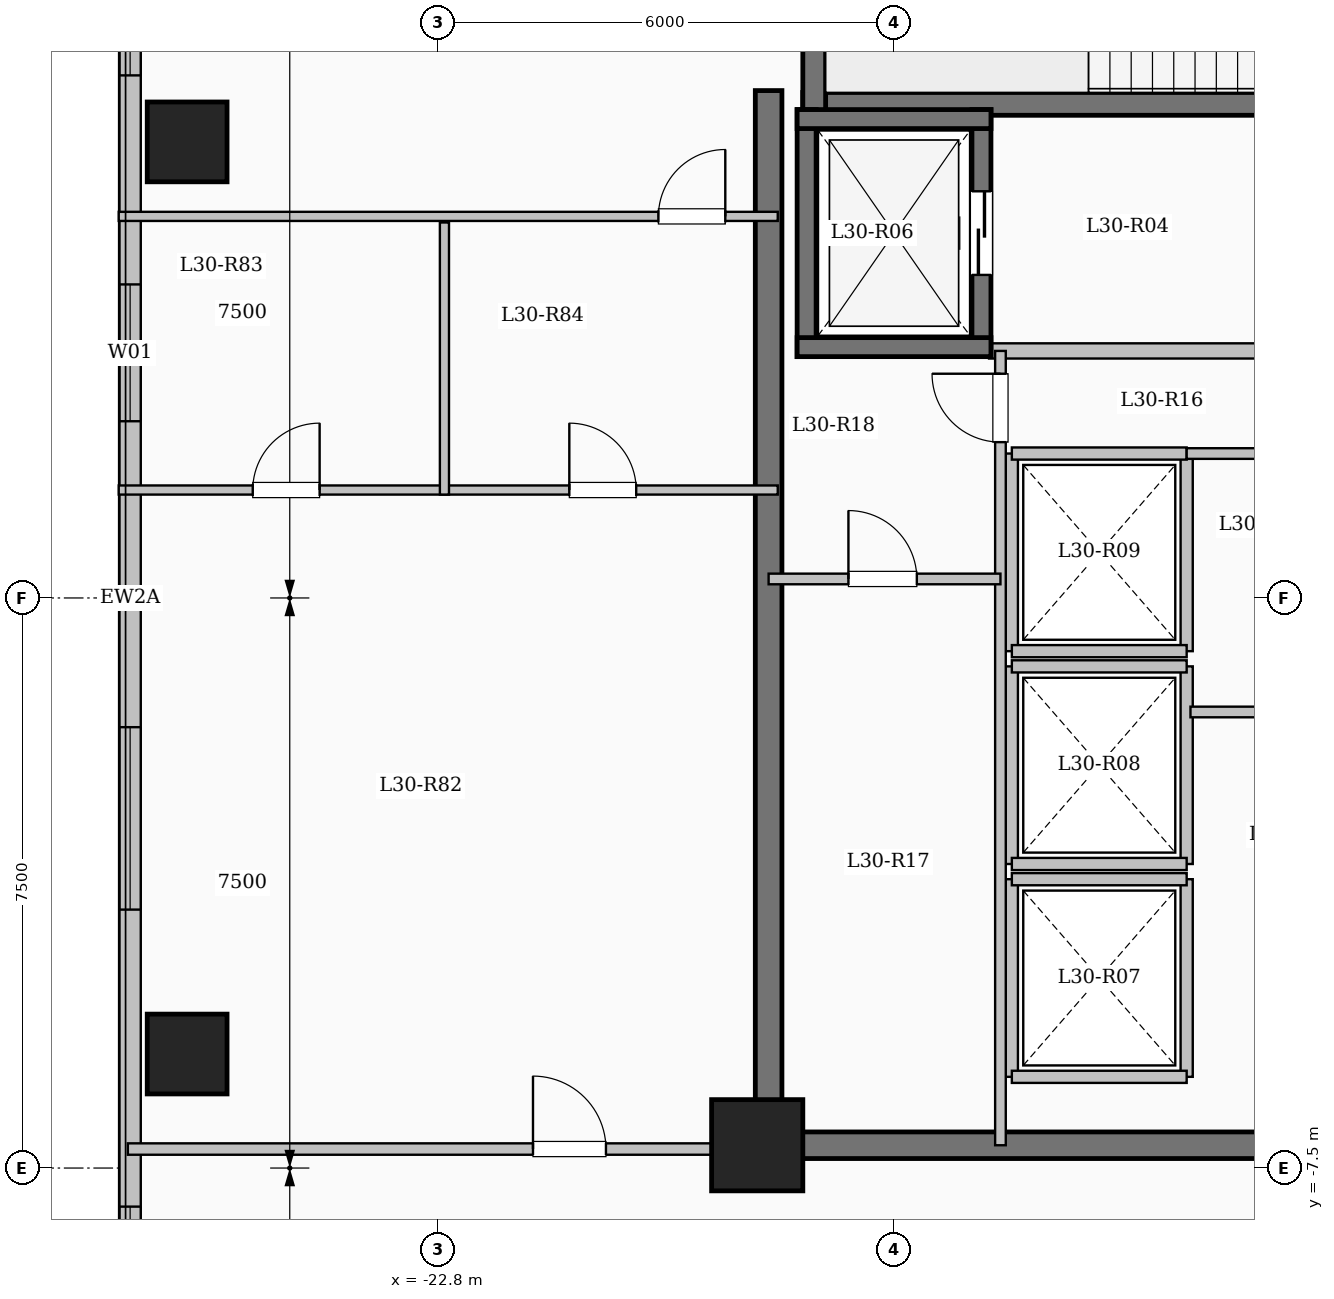
"""IFC4 building model, lengths in metres.
Left out: names, types, materials, properties, quantities, classifications, styles, units other than length and angle.
Written with IfcOpenShell. Run it as: python <this file> out.ifc"""

import sys

from ifc_helpers import new_model, si_unit, direction, frame, frame_2d, origin, origin_2d, place, context, subcontext, project, spatial, rectangle, extrude, element, fill, save


model = new_model("IFC4")
c1 = context("Model", 3, precision=1e-05, world=origin(), true_north=direction((0.0, 1.0)))
c2 = subcontext(c1, "Body", "Model", "MODEL_VIEW")
j1 = project(units=[si_unit("LENGTHUNIT", "METRE"), si_unit("PLANEANGLEUNIT", "RADIAN")], contexts=[c1])
p1 = place(None, origin())
s1 = spatial("IfcSite", under=j1, at=p1, CompositionType="ELEMENT")
p2 = place(p1, origin())
s2 = spatial("IfcBuilding", under=s1, at=p2, CompositionType="ELEMENT")
p3 = place(p2, frame((0.0, 0.0, 111.8)))
s3 = spatial("IfcBuildingStorey", under=s2, at=p3, CompositionType="ELEMENT", Elevation=111.8)
p4 = place(p3, frame((-18.6, -7.2, 0.0), z_axis=(0.0, 0.0, 1.0), x_axis=(1.0, 0.0, 0.0)))
e1 = element("IfcColumn", 1, at=p4, inside=s3, PredefinedType="COLUMN", context=c2, shape_type="SweptSolid", body=[
    extrude(rectangle(XDim=1.2, YDim=1.2, at=origin_2d()), origin(), (0.0, 0.0, 1.0), 3.35),
])
for number, where, z_axis, x_axis in (
    (2, (-26.1, -6.0, 0.0), (0.0, 0.0, 1.0), (1.0, 0.0, 0.0)),
    (3, (-26.1, 6.0, 0.0), (0.0, 0.0, 1.0), (1.0, 0.0, 0.0)),
):
    element("IfcColumn", number, at=place(p3, frame(where, z_axis=z_axis, x_axis=x_axis)), inside=s3, PredefinedType="COLUMN", context=c2, shape_type="SweptSolid", body=[
        extrude(rectangle(XDim=1.05, YDim=1.05, at=origin_2d()), origin(), (0.0, 0.0, 1.0), 3.35),
    ])
p5 = place(p3, frame((-26.85, -17.85, 0.0), z_axis=(0.0, 0.0, 1.0), x_axis=(0.0, 1.0, 0.0)))
e4 = element("IfcWall", 4, at=p5, inside=s3, PredefinedType="SOLIDWALL", context=c2, shape_type="SweptSolid", body=[
    extrude(rectangle(XDim=35.7, YDim=0.28, at=frame_2d((17.85, 0.0))), origin(), (0.0, 0.0, 1.0), 3.1),
])
p6 = place(p5, frame((2.55, 0.0, 0.9)))
e5 = element("IfcOpeningElement", 5, at=p6, cuts=e4, PredefinedType="OPENING", context=c2, shape_type="SweptSolid", body=[
    extrude(rectangle(XDim=2.4, YDim=1.8, at=frame_2d((1.2, 0.9))), frame((0.0, 0.15, 0.0), z_axis=(0.0, -1.0, 0.0), x_axis=(1.0, 0.0, 0.0)), (0.0, 0.0, 1.0), 0.3),
])
p7 = place(p5, frame((8.343, 0.0, 0.9)))
e6 = element("IfcOpeningElement", 6, at=p7, cuts=e4, PredefinedType="OPENING", context=c2, shape_type="SweptSolid", body=[
    extrude(rectangle(XDim=1.5, YDim=1.65, at=frame_2d((0.75, 0.825))), frame((0.0, 0.15, 0.0), z_axis=(0.0, -1.0, 0.0), x_axis=(1.0, 0.0, 0.0)), (0.0, 0.0, 1.0), 0.3),
])
p8 = place(p5, frame((13.75, 0.0, 0.9)))
e7 = element("IfcOpeningElement", 7, at=p8, cuts=e4, PredefinedType="OPENING", context=c2, shape_type="SweptSolid", body=[
    extrude(rectangle(XDim=2.4, YDim=1.8, at=frame_2d((1.2, 0.9))), frame((0.0, 0.15, 0.0), z_axis=(0.0, -1.0, 0.0), x_axis=(1.0, 0.0, 0.0)), (0.0, 0.0, 1.0), 0.3),
])
p9 = place(p5, frame((20.175, 0.0, 0.9)))
e8 = element("IfcOpeningElement", 8, at=p9, cuts=e4, PredefinedType="OPENING", context=c2, shape_type="SweptSolid", body=[
    extrude(rectangle(XDim=1.8, YDim=1.65, at=frame_2d((0.9, 0.825))), frame((0.0, 0.15, 0.0), z_axis=(0.0, -1.0, 0.0), x_axis=(1.0, 0.0, 0.0)), (0.0, 0.0, 1.0), 0.3),
])
p10 = place(p5, frame((24.725, 0.0, 0.9)))
e9 = element("IfcOpeningElement", 9, at=p10, cuts=e4, PredefinedType="OPENING", context=c2, shape_type="SweptSolid", body=[
    extrude(rectangle(XDim=2.0, YDim=1.7, at=frame_2d((1.0, 0.85))), frame((0.0, 0.15, 0.0), z_axis=(0.0, -1.0, 0.0), x_axis=(1.0, 0.0, 0.0)), (0.0, 0.0, 1.0), 0.3),
])
p11 = place(p5, frame((28.975, 0.0, 0.95)))
e10 = element("IfcOpeningElement", 10, at=p11, cuts=e4, PredefinedType="OPENING", context=c2, shape_type="SweptSolid", body=[
    extrude(rectangle(XDim=1.0, YDim=1.5, at=frame_2d((0.5, 0.75))), frame((0.0, 0.15, 0.0), z_axis=(0.0, -1.0, 0.0), x_axis=(1.0, 0.0, 0.0)), (0.0, 0.0, 1.0), 0.3),
])
p12 = place(p5, frame((32.025, 0.0, 0.9)))
e11 = element("IfcOpeningElement", 11, at=p12, cuts=e4, PredefinedType="OPENING", context=c2, shape_type="SweptSolid", body=[
    extrude(rectangle(XDim=2.0, YDim=1.7, at=frame_2d((1.0, 0.85))), frame((0.0, 0.15, 0.0), z_axis=(0.0, -1.0, 0.0), x_axis=(1.0, 0.0, 0.0)), (0.0, 0.0, 1.0), 0.3),
])
p13 = place(p3, frame((-18.0, 6.5, 0.0), z_axis=(0.0, 0.0, 1.0), x_axis=(1.0, 0.0, 0.0)))
e12 = element("IfcWall", 12, at=p13, inside=s3, PredefinedType="SHEAR", context=c2, shape_type="SweptSolid", body=[
    extrude(rectangle(XDim=8.0, YDim=0.3, at=frame_2d((4.0, 0.0))), origin(), (0.0, 0.0, 1.0), 3.35),
])
p14 = place(p13, frame((6.45, 0.0, 0.0)))
e13 = element("IfcOpeningElement", 13, at=p14, cuts=e12, PredefinedType="OPENING", context=c2, shape_type="SweptSolid", body=[
    extrude(rectangle(XDim=1.0, YDim=2.15, at=frame_2d((0.5, 1.075))), frame((0.0, 0.16, 0.0), z_axis=(0.0, -1.0, 0.0), x_axis=(1.0, 0.0, 0.0)), (0.0, 0.0, 1.0), 0.32),
])
p15 = place(p3, frame((-17.85, 6.35, 0.0), z_axis=(0.0, 0.0, 1.0), x_axis=(0.0, 1.0, 0.0)))
e14 = element("IfcWall", 14, at=p15, inside=s3, PredefinedType="SHEAR", context=c2, shape_type="SweptSolid", body=[
    extrude(rectangle(XDim=3.59, YDim=0.3, at=frame_2d((1.795, 0.0))), origin(), (0.0, 0.0, 1.0), 3.35),
])
p16 = place(p3, frame((-15.55, 3.25, 0.0), z_axis=(0.0, 0.0, 1.0), x_axis=(1.0, 0.0, 0.0)))
e15 = element("IfcWall", 15, at=p16, inside=s3, PredefinedType="SOLIDWALL", context=c2, shape_type="SweptSolid", body=[
    extrude(rectangle(XDim=5.4, YDim=0.2, at=frame_2d((2.7, 0.0))), origin(), (0.0, 0.0, 1.0), 3.1),
])
p17 = place(p3, frame((-17.95, 3.175, 0.0), z_axis=(0.0, 0.0, 1.0), x_axis=(0.0, 1.0, 0.0)))
e16 = element("IfcWall", 16, at=p17, inside=s3, PredefinedType="SHEAR", context=c2, shape_type="SweptSolid", body=[
    extrude(rectangle(XDim=3.25, YDim=0.25, at=frame_2d((1.625, 0.0))), origin(), (0.0, 0.0, 1.0), 3.35),
])
p18 = place(p3, frame((-15.65, 3.175, 0.0), z_axis=(0.0, 0.0, 1.0), x_axis=(0.0, 1.0, 0.0)))
e17 = element("IfcWall", 17, at=p18, inside=s3, PredefinedType="SHEAR", context=c2, shape_type="SweptSolid", body=[
    extrude(rectangle(XDim=3.25, YDim=0.25, at=frame_2d((1.625, 0.0))), origin(), (0.0, 0.0, 1.0), 3.35),
])
p19 = place(p18, frame((1.075, 0.0, 0.0)))
e18 = element("IfcOpeningElement", 18, at=p19, cuts=e17, PredefinedType="OPENING", context=c2, shape_type="SweptSolid", body=[
    extrude(rectangle(XDim=1.1, YDim=2.15, at=frame_2d((0.55, 1.075))), frame((0.0, 0.135, 0.0), z_axis=(0.0, -1.0, 0.0), x_axis=(1.0, 0.0, 0.0)), (0.0, 0.0, 1.0), 0.27),
])
for number, where, z_axis, x_axis in (
    (19, (-18.075, 3.3, 0.0), (0.0, 0.0, 1.0), (1.0, 0.0, 0.0)),
    (20, (-18.075, 6.3, 0.0), (0.0, 0.0, 1.0), (1.0, 0.0, 0.0)),
):
    element("IfcWall", number, at=place(p3, frame(where, z_axis=z_axis, x_axis=x_axis)), inside=s3, PredefinedType="SHEAR", context=c2, shape_type="SweptSolid", body=[
        extrude(rectangle(XDim=2.55, YDim=0.25, at=frame_2d((1.275, 0.0))), origin(), (0.0, 0.0, 1.0), 3.35),
    ])
for number, where, z_axis, x_axis in (
    (21, (-15.25, -6.3, 0.0), (0.0, 0.0, 1.0), (0.0, 1.0, 0.0)),
    (22, (-12.95, -6.3, 0.0), (0.0, 0.0, 1.0), (0.0, 1.0, 0.0)),
):
    element("IfcWall", number, at=place(p3, frame(where, z_axis=z_axis, x_axis=x_axis)), inside=s3, PredefinedType="SOLIDWALL", context=c2, shape_type="SweptSolid", body=[
        extrude(rectangle(XDim=2.6, YDim=0.16, at=frame_2d((1.3, 0.0))), origin(), (0.0, 0.0, 1.0), 3.1),
    ])
for number, where, z_axis, x_axis in (
    (23, (-15.25, -6.3, 0.0), (0.0, 0.0, 1.0), (1.0, 0.0, 0.0)),
    (24, (-15.25, -3.7, 0.0), (0.0, 0.0, 1.0), (1.0, 0.0, 0.0)),
):
    element("IfcWall", number, at=place(p3, frame(where, z_axis=z_axis, x_axis=x_axis)), inside=s3, PredefinedType="SOLIDWALL", context=c2, shape_type="SweptSolid", body=[
        extrude(rectangle(XDim=2.3, YDim=0.16, at=frame_2d((1.15, 0.0))), origin(), (0.0, 0.0, 1.0), 3.1),
    ])
for number, where, z_axis, x_axis in (
    (25, (-15.25, -3.5, 0.0), (0.0, 0.0, 1.0), (0.0, 1.0, 0.0)),
    (26, (-12.95, -3.5, 0.0), (0.0, 0.0, 1.0), (0.0, 1.0, 0.0)),
):
    element("IfcWall", number, at=place(p3, frame(where, z_axis=z_axis, x_axis=x_axis)), inside=s3, PredefinedType="SOLIDWALL", context=c2, shape_type="SweptSolid", body=[
        extrude(rectangle(XDim=2.6, YDim=0.16, at=frame_2d((1.3, 0.0))), origin(), (0.0, 0.0, 1.0), 3.1),
    ])
for number, where, z_axis, x_axis in (
    (27, (-15.25, -3.5, 0.0), (0.0, 0.0, 1.0), (1.0, 0.0, 0.0)),
    (28, (-15.25, -0.9, 0.0), (0.0, 0.0, 1.0), (1.0, 0.0, 0.0)),
):
    element("IfcWall", number, at=place(p3, frame(where, z_axis=z_axis, x_axis=x_axis)), inside=s3, PredefinedType="SOLIDWALL", context=c2, shape_type="SweptSolid", body=[
        extrude(rectangle(XDim=2.3, YDim=0.16, at=frame_2d((1.15, 0.0))), origin(), (0.0, 0.0, 1.0), 3.1),
    ])
for number, where, z_axis, x_axis in (
    (29, (-15.25, -0.7, 0.0), (0.0, 0.0, 1.0), (0.0, 1.0, 0.0)),
    (30, (-12.95, -0.7, 0.0), (0.0, 0.0, 1.0), (0.0, 1.0, 0.0)),
):
    element("IfcWall", number, at=place(p3, frame(where, z_axis=z_axis, x_axis=x_axis)), inside=s3, PredefinedType="SOLIDWALL", context=c2, shape_type="SweptSolid", body=[
        extrude(rectangle(XDim=2.6, YDim=0.16, at=frame_2d((1.3, 0.0))), origin(), (0.0, 0.0, 1.0), 3.1),
    ])
for number, where, z_axis, x_axis in (
    (31, (-15.25, -0.7, 0.0), (0.0, 0.0, 1.0), (1.0, 0.0, 0.0)),
    (32, (-15.25, 1.9, 0.0), (0.0, 0.0, 1.0), (1.0, 0.0, 0.0)),
):
    element("IfcWall", number, at=place(p3, frame(where, z_axis=z_axis, x_axis=x_axis)), inside=s3, PredefinedType="SOLIDWALL", context=c2, shape_type="SweptSolid", body=[
        extrude(rectangle(XDim=2.3, YDim=0.16, at=frame_2d((1.15, 0.0))), origin(), (0.0, 0.0, 1.0), 3.1),
    ])
p20 = place(p3, frame((-18.45, -7.375, 0.0), z_axis=(0.0, 0.0, 1.0), x_axis=(0.0, 1.0, 0.0)))
e33 = element("IfcWall", 33, at=p20, inside=s3, PredefinedType="SHEAR", context=c2, shape_type="SweptSolid", body=[
    extrude(rectangle(XDim=14.05, YDim=0.35, at=frame_2d((7.025, 0.0))), origin(), (0.0, 0.0, 1.0), 3.35),
])
p21 = place(p3, frame((-18.625, -7.2, 0.0), z_axis=(0.0, 0.0, 1.0), x_axis=(1.0, 0.0, 0.0)))
e34 = element("IfcWall", 34, at=p21, inside=s3, PredefinedType="SHEAR", context=c2, shape_type="SweptSolid", body=[
    extrude(rectangle(XDim=8.55, YDim=0.35, at=frame_2d((4.275, 0.0))), origin(), (0.0, 0.0, 1.0), 3.35),
])
p22 = place(p3, frame((-12.95, 1.9, 0.0), z_axis=(0.0, 0.0, 1.0), x_axis=(1.0, 0.0, 0.0)))
e35 = element("IfcWall", 35, at=p22, inside=s3, PredefinedType="PARTITIONING", context=c2, shape_type="SweptSolid", body=[
    extrude(rectangle(XDim=2.8, YDim=0.14, at=frame_2d((1.4, 0.0))), origin(), (0.0, 0.0, 1.0), 3.1),
])
p23 = place(p3, frame((-15.4, -7.2, 0.0), z_axis=(0.0, 0.0, 1.0), x_axis=(0.0, 1.0, 0.0)))
e36 = element("IfcWall", 36, at=p23, inside=s3, PredefinedType="PARTITIONING", context=c2, shape_type="SweptSolid", body=[
    extrude(rectangle(XDim=10.45, YDim=0.14, at=frame_2d((5.225, 0.0))), origin(), (0.0, 0.0, 1.0), 3.1),
])
p24 = place(p23, frame((9.25, 0.0, 0.0)))
e37 = element("IfcOpeningElement", 37, at=p24, cuts=e36, PredefinedType="OPENING", context=c2, shape_type="SweptSolid", body=[
    extrude(rectangle(XDim=0.9, YDim=2.08, at=frame_2d((0.45, 1.04))), frame((0.0, 0.08, 0.0), z_axis=(0.0, -1.0, 0.0), x_axis=(1.0, 0.0, 0.0)), (0.0, 0.0, 1.0), 0.16),
])
p25 = place(p3, frame((-18.45, 0.25, 0.0), z_axis=(0.0, 0.0, 1.0), x_axis=(1.0, 0.0, 0.0)))
e38 = element("IfcWall", 38, at=p25, inside=s3, PredefinedType="PARTITIONING", context=c2, shape_type="SweptSolid", body=[
    extrude(rectangle(XDim=3.05, YDim=0.14, at=frame_2d((1.525, 0.0))), origin(), (0.0, 0.0, 1.0), 3.1),
])
p26 = place(p25, frame((1.05, 0.0, 0.0)))
e39 = element("IfcOpeningElement", 39, at=p26, cuts=e38, PredefinedType="OPENING", context=c2, shape_type="SweptSolid", body=[
    extrude(rectangle(XDim=0.9, YDim=2.08, at=frame_2d((0.45, 1.04))), frame((0.0, 0.08, 0.0), z_axis=(0.0, -1.0, 0.0), x_axis=(1.0, 0.0, 0.0)), (0.0, 0.0, 1.0), 0.16),
])
p27 = place(p3, frame((-12.9, -1.5, 0.0), z_axis=(0.0, 0.0, 1.0), x_axis=(1.0, 0.0, 0.0)))
e40 = element("IfcWall", 40, at=p27, inside=s3, PredefinedType="PARTITIONING", context=c2, shape_type="SweptSolid", body=[
    extrude(rectangle(XDim=2.7, YDim=0.14, at=frame_2d((1.35, 0.0))), origin(), (0.0, 0.0, 1.0), 3.1),
])
p28 = place(p3, frame((-26.88, -7.25, 0.0), z_axis=(0.0, 0.0, 1.0), x_axis=(1.0, 0.0, 0.0)))
e41 = element("IfcWall", 41, at=p28, inside=s3, PredefinedType="PARTITIONING", context=c2, shape_type="SweptSolid", body=[
    extrude(rectangle(XDim=8.43, YDim=0.15, at=frame_2d((4.215, 0.0))), origin(), (0.0, 0.0, 1.0), 3.1),
])
p29 = place(p28, frame((5.33, 0.0, 0.0)))
e42 = element("IfcOpeningElement", 42, at=p29, cuts=e41, PredefinedType="OPENING", context=c2, shape_type="SweptSolid", body=[
    extrude(rectangle(XDim=0.96, YDim=2.15, at=frame_2d((0.48, 1.075))), frame((0.0, 0.085, 0.0), z_axis=(0.0, -1.0, 0.0), x_axis=(1.0, 0.0, 0.0)), (0.0, 0.0, 1.0), 0.17),
])
p30 = place(p3, frame((-27.0, 1.42, 0.0), z_axis=(0.0, 0.0, 1.0), x_axis=(1.0, 0.0, 0.0)))
e43 = element("IfcWall", 43, at=p30, inside=s3, PredefinedType="PARTITIONING", context=c2, shape_type="SweptSolid", body=[
    extrude(rectangle(XDim=8.67, YDim=0.12, at=frame_2d((4.335, 0.0))), origin(), (0.0, 0.0, 1.0), 3.1),
])
p31 = place(p30, frame((1.763, 0.0, 0.0)))
e44 = element("IfcOpeningElement", 44, at=p31, cuts=e43, PredefinedType="OPENING", context=c2, shape_type="SweptSolid", body=[
    extrude(rectangle(XDim=0.88, YDim=2.1, at=frame_2d((0.44, 1.05))), frame((0.0, 0.07, 0.0), z_axis=(0.0, -1.0, 0.0), x_axis=(1.0, 0.0, 0.0)), (0.0, 0.0, 1.0), 0.14),
])
p32 = place(p30, frame((5.928, 0.0, 0.0)))
e45 = element("IfcOpeningElement", 45, at=p32, cuts=e43, PredefinedType="OPENING", context=c2, shape_type="SweptSolid", body=[
    extrude(rectangle(XDim=0.88, YDim=2.1, at=frame_2d((0.44, 1.05))), frame((0.0, 0.07, 0.0), z_axis=(0.0, -1.0, 0.0), x_axis=(1.0, 0.0, 0.0)), (0.0, 0.0, 1.0), 0.14),
])
p33 = place(p3, frame((-27.0, 5.02, 0.0), z_axis=(0.0, 0.0, 1.0), x_axis=(1.0, 0.0, 0.0)))
e46 = element("IfcWall", 46, at=p33, inside=s3, PredefinedType="PARTITIONING", context=c2, shape_type="SweptSolid", body=[
    extrude(rectangle(XDim=8.67, YDim=0.12, at=frame_2d((4.335, 0.0))), origin(), (0.0, 0.0, 1.0), 3.1),
])
p34 = place(p33, frame((7.1, 0.0, 0.0)))
e47 = element("IfcOpeningElement", 47, at=p34, cuts=e46, PredefinedType="OPENING", context=c2, shape_type="SweptSolid", body=[
    extrude(rectangle(XDim=0.88, YDim=2.1, at=frame_2d((0.44, 1.05))), frame((0.0, 0.07, 0.0), z_axis=(0.0, -1.0, 0.0), x_axis=(1.0, 0.0, 0.0)), (0.0, 0.0, 1.0), 0.14),
])
p35 = place(p3, frame((-22.715, 1.36, 0.0), z_axis=(0.0, 0.0, 1.0), x_axis=(0.0, 1.0, 0.0)))
e48 = element("IfcWall", 48, at=p35, inside=s3, PredefinedType="PARTITIONING", context=c2, shape_type="SweptSolid", body=[
    extrude(rectangle(XDim=3.58, YDim=0.12, at=frame_2d((1.79, 0.0))), origin(), (0.0, 0.0, 1.0), 3.1),
])
p36 = place(p7, origin())
e49 = element("IfcWindow", 49, at=p36, inside=s3, PartitioningType="SINGLE_PANEL", PredefinedType="WINDOW", context=c2, shape_type="SweptSolid", body=[
    extrude(rectangle(XDim=1.5, YDim=1.65, at=frame_2d((0.75, 0.825))), frame((0.0, 0.03, 0.0), z_axis=(0.0, -1.0, 0.0), x_axis=(1.0, 0.0, 0.0)), (0.0, 0.0, 1.0), 0.06),
])
fill(e6, e49)
p37 = place(p8, origin())
e50 = element("IfcWindow", 50, at=p37, inside=s3, PartitioningType="SINGLE_PANEL", PredefinedType="WINDOW", context=c2, shape_type="SweptSolid", body=[
    extrude(rectangle(XDim=2.4, YDim=1.8, at=frame_2d((1.2, 0.9))), frame((0.0, 0.03, 0.0), z_axis=(0.0, -1.0, 0.0), x_axis=(1.0, 0.0, 0.0)), (0.0, 0.0, 1.0), 0.06),
])
fill(e7, e50)
p38 = place(p9, origin())
e51 = element("IfcWindow", 51, at=p38, inside=s3, PartitioningType="SINGLE_PANEL", PredefinedType="WINDOW", context=c2, shape_type="SweptSolid", body=[
    extrude(rectangle(XDim=1.8, YDim=1.65, at=frame_2d((0.9, 0.825))), frame((0.0, 0.03, 0.0), z_axis=(0.0, -1.0, 0.0), x_axis=(1.0, 0.0, 0.0)), (0.0, 0.0, 1.0), 0.06),
])
fill(e8, e51)
p39 = place(p10, origin())
e52 = element("IfcWindow", 52, at=p39, inside=s3, PartitioningType="SINGLE_PANEL", PredefinedType="WINDOW", context=c2, shape_type="SweptSolid", body=[
    extrude(rectangle(XDim=2.0, YDim=1.7, at=frame_2d((1.0, 0.85))), frame((0.0, 0.03, 0.0), z_axis=(0.0, -1.0, 0.0), x_axis=(1.0, 0.0, 0.0)), (0.0, 0.0, 1.0), 0.06),
])
fill(e9, e52)
p40 = place(p19, origin())
e53 = element("IfcDoor", 53, at=p40, inside=s3, OperationType="SLIDING_TO_LEFT", PredefinedType="DOOR", context=c2, shape_type="SweptSolid", body=[
    extrude(rectangle(XDim=1.1, YDim=2.15, at=frame_2d((0.55, 1.075))), frame((0.0, 0.025, 0.0), z_axis=(0.0, -1.0, 0.0), x_axis=(1.0, 0.0, 0.0)), (0.0, 0.0, 1.0), 0.05),
])
fill(e18, e53)
p41 = place(p24, origin())
e54 = element("IfcDoor", 54, at=p41, inside=s3, OperationType="SINGLE_SWING_RIGHT", PredefinedType="DOOR", context=c2, shape_type="SweptSolid", body=[
    extrude(rectangle(XDim=0.9, YDim=2.08, at=frame_2d((0.45, 1.04))), frame((0.0, 0.025, 0.0), z_axis=(0.0, -1.0, 0.0), x_axis=(1.0, 0.0, 0.0)), (0.0, 0.0, 1.0), 0.05),
])
fill(e37, e54)
p42 = place(p26, origin())
e55 = element("IfcDoor", 55, at=p42, inside=s3, OperationType="SINGLE_SWING_LEFT", PredefinedType="DOOR", context=c2, shape_type="SweptSolid", body=[
    extrude(rectangle(XDim=0.9, YDim=2.08, at=frame_2d((0.45, 1.04))), frame((0.0, 0.025, 0.0), z_axis=(0.0, -1.0, 0.0), x_axis=(1.0, 0.0, 0.0)), (0.0, 0.0, 1.0), 0.05),
])
fill(e39, e55)
p43 = place(p29, origin())
e56 = element("IfcDoor", 56, at=p43, inside=s3, OperationType="SINGLE_SWING_LEFT", PredefinedType="DOOR", context=c2, shape_type="SweptSolid", body=[
    extrude(rectangle(XDim=0.96, YDim=2.15, at=frame_2d((0.48, 1.075))), frame((0.0, 0.025, 0.0), z_axis=(0.0, -1.0, 0.0), x_axis=(1.0, 0.0, 0.0)), (0.0, 0.0, 1.0), 0.05),
])
fill(e42, e56)
p44 = place(p31, origin())
e57 = element("IfcDoor", 57, at=p44, inside=s3, OperationType="SINGLE_SWING_RIGHT", PredefinedType="DOOR", context=c2, shape_type="SweptSolid", body=[
    extrude(rectangle(XDim=0.88, YDim=2.1, at=frame_2d((0.44, 1.05))), frame((0.0, 0.025, 0.0), z_axis=(0.0, -1.0, 0.0), x_axis=(1.0, 0.0, 0.0)), (0.0, 0.0, 1.0), 0.05),
])
fill(e44, e57)
p45 = place(p32, origin())
e58 = element("IfcDoor", 58, at=p45, inside=s3, OperationType="SINGLE_SWING_LEFT", PredefinedType="DOOR", context=c2, shape_type="SweptSolid", body=[
    extrude(rectangle(XDim=0.88, YDim=2.1, at=frame_2d((0.44, 1.05))), frame((0.0, 0.025, 0.0), z_axis=(0.0, -1.0, 0.0), x_axis=(1.0, 0.0, 0.0)), (0.0, 0.0, 1.0), 0.05),
])
fill(e45, e58)
p46 = place(p34, origin())
e59 = element("IfcDoor", 59, at=p46, inside=s3, OperationType="SINGLE_SWING_RIGHT", PredefinedType="DOOR", context=c2, shape_type="SweptSolid", body=[
    extrude(rectangle(XDim=0.88, YDim=2.1, at=frame_2d((0.44, 1.05))), frame((0.0, 0.025, 0.0), z_axis=(0.0, -1.0, 0.0), x_axis=(1.0, 0.0, 0.0)), (0.0, 0.0, 1.0), 0.05),
])
fill(e47, e59)
save(model, sys.argv[1])
